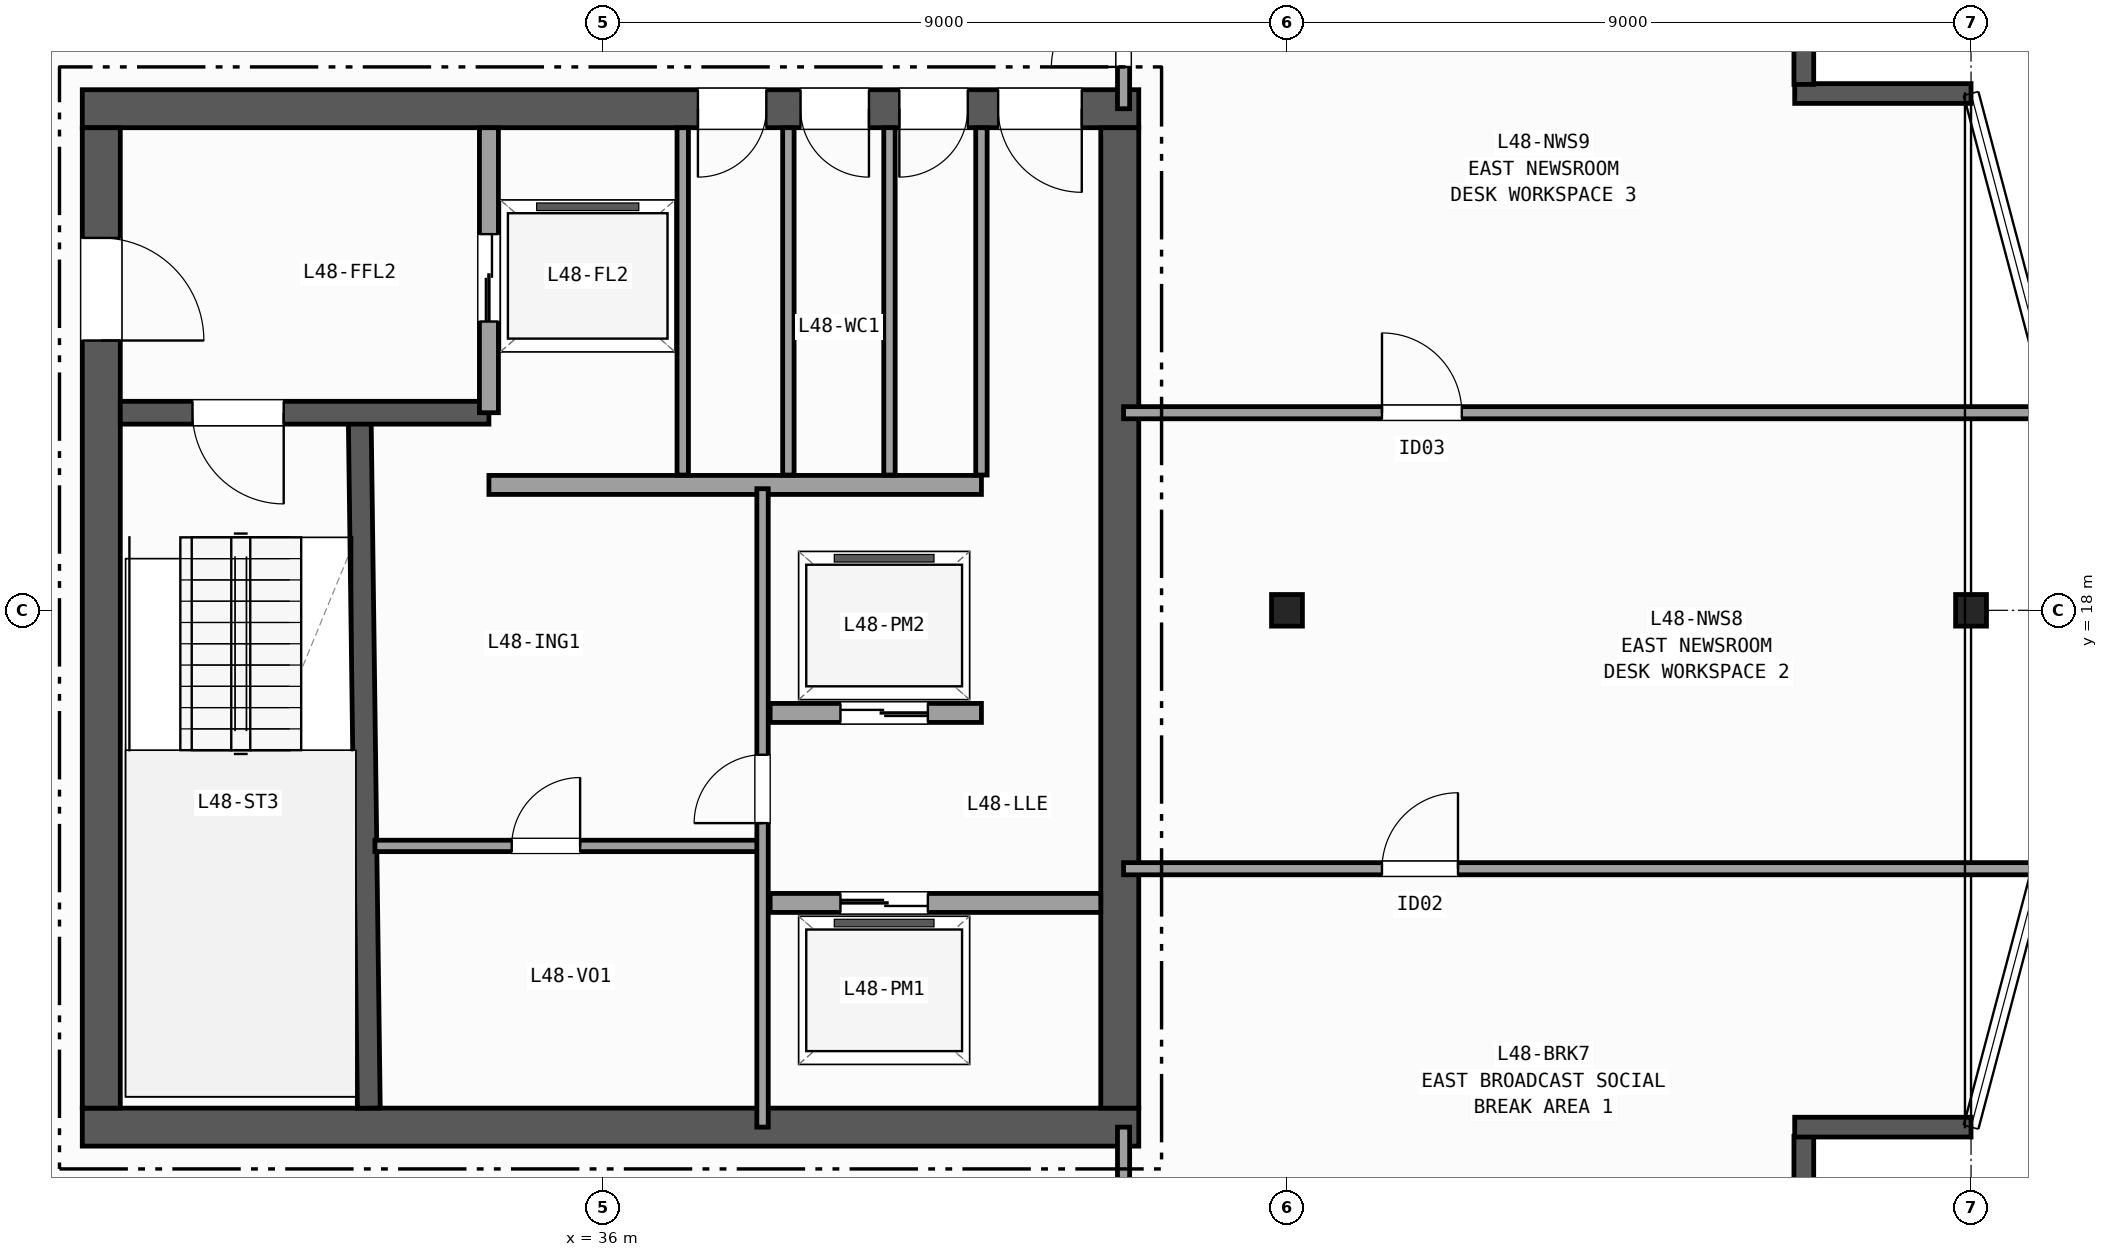
"""IFC4 building model, lengths in metres.
Left out: names, types, materials, properties, quantities, classifications, styles, units other than length and angle.
Written with IfcOpenShell. Run it as: python <this file> out.ifc"""

import sys

from ifc_helpers import new_model, si_unit, direction, frame, frame_2d, origin, origin_2d, place, context, subcontext, project, spatial, rectangle, i_section, extrude, element, fill, save


model = new_model("IFC4")
c1 = context("Model", 3, precision=1e-05, world=origin(), true_north=direction((0.0, 1.0)))
c2 = subcontext(c1, "Body", "Model", "MODEL_VIEW")
j1 = project(units=[si_unit("LENGTHUNIT", "METRE"), si_unit("PLANEANGLEUNIT", "RADIAN")], contexts=[c1])
p1 = place(None, origin())
s1 = spatial("IfcSite", under=j1, at=p1, CompositionType="ELEMENT")
p2 = place(p1, origin())
s2 = spatial("IfcBuilding", under=s1, at=p2, CompositionType="ELEMENT")
p3 = place(p2, frame((0.0, 0.0, 192.7)))
s3 = spatial("IfcBuildingStorey", under=s2, at=p3, CompositionType="ELEMENT", Elevation=192.7)
for number, where, z_axis, x_axis in (
    (1, (45.0, 18.0, 0.0), (0.0, 0.0, 1.0), (1.0, 0.0, 0.0)),
    (2, (54.0, 18.0, 0.0), (0.0, 0.0, 1.0), (1.0, 0.0, 0.0)),
):
    element("IfcColumn", number, at=place(p3, frame(where, z_axis=z_axis, x_axis=x_axis)), inside=s3, PredefinedType="COLUMN", context=c2, shape_type="SweptSolid", body=[
        extrude(i_section(OverallWidth=0.406, OverallDepth=0.416, WebThickness=0.03, FlangeThickness=0.048, FilletRadius=0.015, at=origin_2d()), origin(), (0.0, 0.0, 1.0), 3.7),
    ])
p4 = place(p3, frame((51.8, 9.0, 0.0), z_axis=(0.0, 0.0, 1.0), x_axis=(0.0, 1.0, 0.0)))
e3 = element("IfcWall", 3, at=p4, inside=s3, PredefinedType="SOLIDWALL", context=c2, shape_type="SweptSolid", body=[
    extrude(rectangle(XDim=2.08, YDim=0.26, at=frame_2d((1.04, 0.0))), origin(), (0.0, 0.0, 1.0), 3.37),
])
for number, where, z_axis, x_axis in (
    (4, (51.68, 11.2, 0.0), (0.0, 0.0, 1.0), (1.0, 0.0, 0.0)),
    (5, (54.0, 24.8, 0.0), (0.0, 0.0, 1.0), (-1.0, 0.0, 0.0)),
):
    element("IfcWall", number, at=place(p3, frame(where, z_axis=z_axis, x_axis=x_axis)), inside=s3, PredefinedType="SOLIDWALL", context=c2, shape_type="SweptSolid", body=[
        extrude(rectangle(XDim=2.32, YDim=0.26, at=frame_2d((1.16, 0.0))), origin(), (0.0, 0.0, 1.0), 3.37),
    ])
p5 = place(p3, frame((51.8, 24.92, 0.0), z_axis=(0.0, 0.0, 1.0), x_axis=(0.0, 1.0, 0.0)))
e6 = element("IfcWall", 6, at=p5, inside=s3, PredefinedType="SOLIDWALL", context=c2, shape_type="SweptSolid", body=[
    extrude(rectangle(XDim=2.08, YDim=0.26, at=frame_2d((1.04, 0.0))), origin(), (0.0, 0.0, 1.0), 3.37),
])
p6 = place(p3, frame((29.15, 11.2, 0.0), z_axis=(0.0, 0.0, 1.0), x_axis=(1.0, 0.0, 0.0)))
e7 = element("IfcWall", 7, at=p6, inside=s3, PredefinedType="SHEAR", context=c2, shape_type="SweptSolid", body=[
    extrude(rectangle(XDim=13.9, YDim=0.5, at=frame_2d((6.95, 0.0))), origin(), (0.0, 0.0, 1.0), 3.37),
])
p7 = place(p3, frame((43.05, 24.6, 0.0), z_axis=(0.0, 0.0, 1.0), x_axis=(-1.0, 0.0, 0.0)))
e8 = element("IfcWall", 8, at=p7, inside=s3, PredefinedType="SHEAR", context=c2, shape_type="SweptSolid", body=[
    extrude(rectangle(XDim=13.9, YDim=0.5, at=frame_2d((6.95, 0.0))), origin(), (0.0, 0.0, 1.0), 3.37),
])
p8 = place(p7, frame((0.75, 0.0, 0.0)))
e9 = element("IfcOpeningElement", 9, at=p8, cuts=e8, PredefinedType="OPENING", context=c2, shape_type="SweptSolid", body=[
    extrude(rectangle(XDim=1.1, YDim=2.15, at=frame_2d((0.55, 1.075))), frame((0.0, 0.26, 0.0), z_axis=(0.0, -1.0, 0.0), x_axis=(1.0, 0.0, 0.0)), (0.0, 0.0, 1.0), 0.52),
])
p9 = place(p7, frame((2.25, 0.0, 0.0)))
e10 = element("IfcOpeningElement", 10, at=p9, cuts=e8, PredefinedType="OPENING", context=c2, shape_type="SweptSolid", body=[
    extrude(rectangle(XDim=0.9, YDim=2.1, at=frame_2d((0.45, 1.05))), frame((0.0, 0.26, 0.0), z_axis=(0.0, -1.0, 0.0), x_axis=(1.0, 0.0, 0.0)), (0.0, 0.0, 1.0), 0.52),
])
p10 = place(p7, frame((3.55, 0.0, 0.0)))
e11 = element("IfcOpeningElement", 11, at=p10, cuts=e8, PredefinedType="OPENING", context=c2, shape_type="SweptSolid", body=[
    extrude(rectangle(XDim=0.9, YDim=2.1, at=frame_2d((0.45, 1.05))), frame((0.0, 0.26, 0.0), z_axis=(0.0, -1.0, 0.0), x_axis=(1.0, 0.0, 0.0)), (0.0, 0.0, 1.0), 0.52),
])
p11 = place(p7, frame((4.9, 0.0, 0.0)))
e12 = element("IfcOpeningElement", 12, at=p11, cuts=e8, PredefinedType="OPENING", context=c2, shape_type="SweptSolid", body=[
    extrude(rectangle(XDim=0.9, YDim=2.1, at=frame_2d((0.45, 1.05))), frame((0.0, 0.26, 0.0), z_axis=(0.0, -1.0, 0.0), x_axis=(1.0, 0.0, 0.0)), (0.0, 0.0, 1.0), 0.52),
])
p12 = place(p3, frame((29.4, 24.35, 0.0), z_axis=(0.0, 0.0, 1.0), x_axis=(0.0, -1.0, 0.0)))
e13 = element("IfcWall", 13, at=p12, inside=s3, PredefinedType="SHEAR", context=c2, shape_type="SweptSolid", body=[
    extrude(rectangle(XDim=12.9, YDim=0.5, at=frame_2d((6.45, 0.0))), origin(), (0.0, 0.0, 1.0), 3.37),
])
p13 = place(p12, frame((1.45, 0.0, 0.0)))
e14 = element("IfcOpeningElement", 14, at=p13, cuts=e13, PredefinedType="OPENING", context=c2, shape_type="SweptSolid", body=[
    extrude(rectangle(XDim=1.35, YDim=2.15, at=frame_2d((0.675, 1.075))), frame((0.0, 0.26, 0.0), z_axis=(0.0, -1.0, 0.0), x_axis=(1.0, 0.0, 0.0)), (0.0, 0.0, 1.0), 0.52),
])
p14 = place(p3, frame((42.8, 11.45, 0.0), z_axis=(0.0, 0.0, 1.0), x_axis=(0.0, 1.0, 0.0)))
e15 = element("IfcWall", 15, at=p14, inside=s3, PredefinedType="SHEAR", context=c2, shape_type="SweptSolid", body=[
    extrude(rectangle(XDim=12.9, YDim=0.5, at=frame_2d((6.45, 0.0))), origin(), (0.0, 0.0, 1.0), 3.37),
])
p15 = place(p3, frame((32.92, 11.45, 0.0), z_axis=(0.0, 0.0, 1.0), x_axis=(-0.013171578211, 0.999913251001, 0.0)))
e16 = element("IfcWall", 16, at=p15, inside=s3, PredefinedType="SHEAR", context=c2, shape_type="SweptSolid", body=[
    extrude(rectangle(XDim=9.101, YDim=0.3, at=frame_2d((4.55, 0.0))), origin(), (0.0, 0.0, 1.0), 3.37),
])
p16 = place(p3, frame((34.5, 20.6, 0.0), z_axis=(0.0, 0.0, 1.0), x_axis=(-1.0, 0.0, 0.0)))
e17 = element("IfcWall", 17, at=p16, inside=s3, PredefinedType="SHEAR", context=c2, shape_type="SweptSolid", body=[
    extrude(rectangle(XDim=4.85, YDim=0.3, at=frame_2d((2.425, 0.0))), origin(), (0.0, 0.0, 1.0), 3.37),
])
p17 = place(p16, frame((2.7, 0.0, 0.0)))
e18 = element("IfcOpeningElement", 18, at=p17, cuts=e17, PredefinedType="OPENING", context=c2, shape_type="SweptSolid", body=[
    extrude(rectangle(XDim=1.2, YDim=2.15, at=frame_2d((0.6, 1.075))), frame((0.0, 0.16, 0.0), z_axis=(0.0, -1.0, 0.0), x_axis=(1.0, 0.0, 0.0)), (0.0, 0.0, 1.0), 0.32),
])
p18 = place(p3, frame((34.5, 20.6, 0.0), z_axis=(0.0, 0.0, 1.0), x_axis=(0.0, 1.0, 0.0)))
e19 = element("IfcWall", 19, at=p18, inside=s3, PredefinedType="PARTITIONING", context=c2, shape_type="SweptSolid", body=[
    extrude(rectangle(XDim=3.75, YDim=0.25, at=frame_2d((1.875, 0.0))), origin(), (0.0, 0.0, 1.0), 3.37),
])
p19 = place(p18, frame((1.2, 0.0, 0.0)))
e20 = element("IfcOpeningElement", 20, at=p19, cuts=e19, PredefinedType="OPENING", context=c2, shape_type="SweptSolid", body=[
    extrude(rectangle(XDim=1.15, YDim=2.15, at=frame_2d((0.575, 1.075))), frame((0.0, 0.135, 0.0), z_axis=(0.0, -1.0, 0.0), x_axis=(1.0, 0.0, 0.0)), (0.0, 0.0, 1.0), 0.27),
])
p20 = place(p3, frame((34.5, 19.65, 0.0), z_axis=(0.0, 0.0, 1.0), x_axis=(1.0, 0.0, 0.0)))
e21 = element("IfcWall", 21, at=p20, inside=s3, PredefinedType="PARTITIONING", context=c2, shape_type="SweptSolid", body=[
    extrude(rectangle(XDim=6.48, YDim=0.25, at=frame_2d((3.24, 0.0))), origin(), (0.0, 0.0, 1.0), 3.37),
])
p21 = place(p3, frame((38.2, 14.15, 0.0), z_axis=(0.0, 0.0, 1.0), x_axis=(1.0, 0.0, 0.0)))
e22 = element("IfcWall", 22, at=p21, inside=s3, PredefinedType="PARTITIONING", context=c2, shape_type="SweptSolid", body=[
    extrude(rectangle(XDim=4.35, YDim=0.25, at=frame_2d((2.175, 0.0))), origin(), (0.0, 0.0, 1.0), 3.37),
])
p22 = place(p21, frame((0.925, 0.0, 0.0)))
e23 = element("IfcOpeningElement", 23, at=p22, cuts=e22, PredefinedType="OPENING", context=c2, shape_type="SweptSolid", body=[
    extrude(rectangle(XDim=1.15, YDim=2.15, at=frame_2d((0.575, 1.075))), frame((0.0, 0.135, 0.0), z_axis=(0.0, -1.0, 0.0), x_axis=(1.0, 0.0, 0.0)), (0.0, 0.0, 1.0), 0.27),
])
p23 = place(p3, frame((40.98, 16.65, 0.0), z_axis=(0.0, 0.0, 1.0), x_axis=(-1.0, 0.0, 0.0)))
e24 = element("IfcWall", 24, at=p23, inside=s3, PredefinedType="PARTITIONING", context=c2, shape_type="SweptSolid", body=[
    extrude(rectangle(XDim=2.78, YDim=0.25, at=frame_2d((1.39, 0.0))), origin(), (0.0, 0.0, 1.0), 3.37),
])
p24 = place(p23, frame((0.705, 0.0, 0.0)))
e25 = element("IfcOpeningElement", 25, at=p24, cuts=e24, PredefinedType="OPENING", context=c2, shape_type="SweptSolid", body=[
    extrude(rectangle(XDim=1.15, YDim=2.15, at=frame_2d((0.575, 1.075))), frame((0.0, 0.135, 0.0), z_axis=(0.0, -1.0, 0.0), x_axis=(1.0, 0.0, 0.0)), (0.0, 0.0, 1.0), 0.27),
])
p25 = place(p3, frame((33.0, 14.9, 0.0), z_axis=(0.0, 0.0, 1.0), x_axis=(1.0, 0.0, 0.0)))
e26 = element("IfcWall", 26, at=p25, inside=s3, PredefinedType="PARTITIONING", context=c2, shape_type="SweptSolid", body=[
    extrude(rectangle(XDim=5.1, YDim=0.15, at=frame_2d((2.55, 0.0))), origin(), (0.0, 0.0, 1.0), 3.37),
])
p26 = place(p25, frame((1.8, 0.0, 0.0)))
e27 = element("IfcOpeningElement", 27, at=p26, cuts=e26, PredefinedType="OPENING", context=c2, shape_type="SweptSolid", body=[
    extrude(rectangle(XDim=0.9, YDim=2.1, at=frame_2d((0.45, 1.05))), frame((0.0, 0.085, 0.0), z_axis=(0.0, -1.0, 0.0), x_axis=(1.0, 0.0, 0.0)), (0.0, 0.0, 1.0), 0.17),
])
p27 = place(p3, frame((38.1, 11.2, 0.0), z_axis=(0.0, 0.0, 1.0), x_axis=(0.0, 1.0, 0.0)))
e28 = element("IfcWall", 28, at=p27, inside=s3, PredefinedType="PARTITIONING", context=c2, shape_type="SweptSolid", body=[
    extrude(rectangle(XDim=8.4, YDim=0.15, at=frame_2d((4.2, 0.0))), origin(), (0.0, 0.0, 1.0), 3.37),
])
p28 = place(p27, frame((4.0, 0.0, 0.0)))
e29 = element("IfcOpeningElement", 29, at=p28, cuts=e28, PredefinedType="OPENING", context=c2, shape_type="SweptSolid", body=[
    extrude(rectangle(XDim=0.9, YDim=2.1, at=frame_2d((0.45, 1.05))), frame((0.0, 0.085, 0.0), z_axis=(0.0, -1.0, 0.0), x_axis=(1.0, 0.0, 0.0)), (0.0, 0.0, 1.0), 0.17),
])
for number, where, z_axis, x_axis in (
    (30, (37.05, 19.78, 0.0), (0.0, 0.0, 1.0), (0.0, 1.0, 0.0)),
    (31, (38.44, 19.78, 0.0), (0.0, 0.0, 1.0), (0.0, 1.0, 0.0)),
    (32, (39.77, 19.78, 0.0), (0.0, 0.0, 1.0), (0.0, 1.0, 0.0)),
    (33, (40.98, 19.78, 0.0), (0.0, 0.0, 1.0), (0.0, 1.0, 0.0)),
):
    element("IfcWall", number, at=place(p3, frame(where, z_axis=z_axis, x_axis=x_axis)), inside=s3, PredefinedType="PARTITIONING", context=c2, shape_type="SweptSolid", body=[
        extrude(rectangle(XDim=4.57, YDim=0.15, at=frame_2d((2.285, 0.0))), origin(), (0.0, 0.0, 1.0), 3.37),
    ])
p29 = place(p3, frame((42.85, 9.0, 0.0), z_axis=(0.0, 0.0, 1.0), x_axis=(0.0, 1.0, 0.0)))
e34 = element("IfcWall", 34, at=p29, inside=s3, PredefinedType="PARTITIONING", context=c2, shape_type="SweptSolid", body=[
    extrude(rectangle(XDim=2.2, YDim=0.16, at=frame_2d((1.1, 0.0))), origin(), (0.0, 0.0, 1.0), 2.584),
])
p30 = place(p3, frame((42.85, 24.6, 0.0), z_axis=(0.0, 0.0, 1.0), x_axis=(0.0, 1.0, 0.0)))
e35 = element("IfcWall", 35, at=p30, inside=s3, PredefinedType="PARTITIONING", context=c2, shape_type="SweptSolid", body=[
    extrude(rectangle(XDim=2.4, YDim=0.16, at=frame_2d((1.2, 0.0))), origin(), (0.0, 0.0, 1.0), 2.584),
])
p31 = place(p30, frame((0.55, 0.0, 0.0)))
e36 = element("IfcOpeningElement", 36, at=p31, cuts=e35, PredefinedType="OPENING", context=c2, shape_type="SweptSolid", body=[
    extrude(rectangle(XDim=0.95, YDim=2.1, at=frame_2d((0.475, 1.05))), frame((0.0, 0.09, 0.0), z_axis=(0.0, -1.0, 0.0), x_axis=(1.0, 0.0, 0.0)), (0.0, 0.0, 1.0), 0.18),
])
p32 = place(p3, frame((42.85, 14.6, 0.0), z_axis=(0.0, 0.0, 1.0), x_axis=(1.0, 0.0, 0.0)))
e37 = element("IfcWall", 37, at=p32, inside=s3, PredefinedType="PARTITIONING", context=c2, shape_type="SweptSolid", body=[
    extrude(rectangle(XDim=12.05, YDim=0.16, at=frame_2d((6.025, 0.0))), origin(), (0.0, 0.0, 1.0), 3.37),
])
p33 = place(p32, frame((3.4, 0.0, 0.0)))
e38 = element("IfcOpeningElement", 38, at=p33, cuts=e37, PredefinedType="OPENING", context=c2, shape_type="SweptSolid", body=[
    extrude(rectangle(XDim=1.0, YDim=2.1, at=frame_2d((0.5, 1.05))), frame((0.0, 0.09, 0.0), z_axis=(0.0, -1.0, 0.0), x_axis=(1.0, 0.0, 0.0)), (0.0, 0.0, 1.0), 0.18),
])
p34 = place(p3, frame((42.85, 20.6, 0.0), z_axis=(0.0, 0.0, 1.0), x_axis=(1.0, 0.0, 0.0)))
e39 = element("IfcWall", 39, at=p34, inside=s3, PredefinedType="PARTITIONING", context=c2, shape_type="SweptSolid", body=[
    extrude(rectangle(XDim=12.262, YDim=0.16, at=frame_2d((6.131, 0.0))), origin(), (0.0, 0.0, 1.0), 3.37),
])
p35 = place(p34, frame((3.4, 0.0, 0.0)))
e40 = element("IfcOpeningElement", 40, at=p35, cuts=e39, PredefinedType="OPENING", context=c2, shape_type="SweptSolid", body=[
    extrude(rectangle(XDim=1.05, YDim=2.15, at=frame_2d((0.525, 1.075))), frame((0.0, 0.09, 0.0), z_axis=(0.0, -1.0, 0.0), x_axis=(1.0, 0.0, 0.0)), (0.0, 0.0, 1.0), 0.18),
])
p36 = place(p17, origin())
e41 = element("IfcDoor", 41, at=p36, inside=s3, OperationType="SINGLE_SWING_LEFT", PredefinedType="DOOR", context=c2, shape_type="SweptSolid", body=[
    extrude(rectangle(XDim=1.2, YDim=2.15, at=frame_2d((0.6, 1.075))), frame((0.0, 0.025, 0.0), z_axis=(0.0, -1.0, 0.0), x_axis=(1.0, 0.0, 0.0)), (0.0, 0.0, 1.0), 0.05),
])
fill(e18, e41)
p37 = place(p13, origin())
e42 = element("IfcDoor", 42, at=p37, inside=s3, OperationType="SINGLE_SWING_RIGHT", PredefinedType="DOOR", context=c2, shape_type="SweptSolid", body=[
    extrude(rectangle(XDim=1.35, YDim=2.15, at=frame_2d((0.675, 1.075))), frame((0.0, 0.025, 0.0), z_axis=(0.0, -1.0, 0.0), x_axis=(1.0, 0.0, 0.0)), (0.0, 0.0, 1.0), 0.05),
])
fill(e14, e42)
p38 = place(p8, origin())
e43 = element("IfcDoor", 43, at=p38, inside=s3, OperationType="SINGLE_SWING_LEFT", PredefinedType="DOOR", context=c2, shape_type="SweptSolid", body=[
    extrude(rectangle(XDim=1.1, YDim=2.15, at=frame_2d((0.55, 1.075))), frame((0.0, 0.025, 0.0), z_axis=(0.0, -1.0, 0.0), x_axis=(1.0, 0.0, 0.0)), (0.0, 0.0, 1.0), 0.05),
])
fill(e9, e43)
p39 = place(p9, origin())
e44 = element("IfcDoor", 44, at=p39, inside=s3, OperationType="SINGLE_SWING_RIGHT", PredefinedType="DOOR", context=c2, shape_type="SweptSolid", body=[
    extrude(rectangle(XDim=0.9, YDim=2.1, at=frame_2d((0.45, 1.05))), frame((0.0, 0.025, 0.0), z_axis=(0.0, -1.0, 0.0), x_axis=(1.0, 0.0, 0.0)), (0.0, 0.0, 1.0), 0.05),
])
fill(e10, e44)
p40 = place(p10, origin())
e45 = element("IfcDoor", 45, at=p40, inside=s3, OperationType="SINGLE_SWING_LEFT", PredefinedType="DOOR", context=c2, shape_type="SweptSolid", body=[
    extrude(rectangle(XDim=0.9, YDim=2.1, at=frame_2d((0.45, 1.05))), frame((0.0, 0.025, 0.0), z_axis=(0.0, -1.0, 0.0), x_axis=(1.0, 0.0, 0.0)), (0.0, 0.0, 1.0), 0.05),
])
fill(e11, e45)
p41 = place(p11, origin())
e46 = element("IfcDoor", 46, at=p41, inside=s3, OperationType="SINGLE_SWING_RIGHT", PredefinedType="DOOR", context=c2, shape_type="SweptSolid", body=[
    extrude(rectangle(XDim=0.9, YDim=2.1, at=frame_2d((0.45, 1.05))), frame((0.0, 0.025, 0.0), z_axis=(0.0, -1.0, 0.0), x_axis=(1.0, 0.0, 0.0)), (0.0, 0.0, 1.0), 0.05),
])
fill(e12, e46)
p42 = place(p19, origin())
e47 = element("IfcDoor", 47, at=p42, inside=s3, OperationType="DOUBLE_DOOR_SLIDING", PredefinedType="DOOR", context=c2, shape_type="SweptSolid", body=[
    extrude(rectangle(XDim=1.15, YDim=2.15, at=frame_2d((0.575, 1.075))), frame((0.0, 0.025, 0.0), z_axis=(0.0, -1.0, 0.0), x_axis=(1.0, 0.0, 0.0)), (0.0, 0.0, 1.0), 0.05),
])
fill(e20, e47)
p43 = place(p22, origin())
e48 = element("IfcDoor", 48, at=p43, inside=s3, OperationType="DOUBLE_DOOR_SLIDING", PredefinedType="DOOR", context=c2, shape_type="SweptSolid", body=[
    extrude(rectangle(XDim=1.15, YDim=2.15, at=frame_2d((0.575, 1.075))), frame((0.0, 0.025, 0.0), z_axis=(0.0, -1.0, 0.0), x_axis=(1.0, 0.0, 0.0)), (0.0, 0.0, 1.0), 0.05),
])
fill(e23, e48)
p44 = place(p24, origin())
e49 = element("IfcDoor", 49, at=p44, inside=s3, OperationType="DOUBLE_DOOR_SLIDING", PredefinedType="DOOR", context=c2, shape_type="SweptSolid", body=[
    extrude(rectangle(XDim=1.15, YDim=2.15, at=frame_2d((0.575, 1.075))), frame((0.0, 0.025, 0.0), z_axis=(0.0, -1.0, 0.0), x_axis=(1.0, 0.0, 0.0)), (0.0, 0.0, 1.0), 0.05),
])
fill(e25, e49)
p45 = place(p28, origin())
e50 = element("IfcDoor", 50, at=p45, inside=s3, OperationType="SINGLE_SWING_LEFT", PredefinedType="DOOR", context=c2, shape_type="SweptSolid", body=[
    extrude(rectangle(XDim=0.9, YDim=2.1, at=frame_2d((0.45, 1.05))), frame((0.0, 0.025, 0.0), z_axis=(0.0, -1.0, 0.0), x_axis=(1.0, 0.0, 0.0)), (0.0, 0.0, 1.0), 0.05),
])
fill(e29, e50)
p46 = place(p26, origin())
e51 = element("IfcDoor", 51, at=p46, inside=s3, OperationType="SINGLE_SWING_RIGHT", PredefinedType="DOOR", context=c2, shape_type="SweptSolid", body=[
    extrude(rectangle(XDim=0.9, YDim=2.1, at=frame_2d((0.45, 1.05))), frame((0.0, 0.025, 0.0), z_axis=(0.0, -1.0, 0.0), x_axis=(1.0, 0.0, 0.0)), (0.0, 0.0, 1.0), 0.05),
])
fill(e27, e51)
p47 = place(p31, origin())
e52 = element("IfcDoor", 52, at=p47, inside=s3, OperationType="SINGLE_SWING_LEFT", PredefinedType="DOOR", context=c2, shape_type="SweptSolid", body=[
    extrude(rectangle(XDim=0.95, YDim=2.1, at=frame_2d((0.475, 1.05))), frame((0.0, 0.025, 0.0), z_axis=(0.0, -1.0, 0.0), x_axis=(1.0, 0.0, 0.0)), (0.0, 0.0, 1.0), 0.05),
])
fill(e36, e52)
p48 = place(p33, origin())
e53 = element("IfcDoor", 53, at=p48, inside=s3, OperationType="SINGLE_SWING_RIGHT", PredefinedType="DOOR", context=c2, shape_type="SweptSolid", body=[
    extrude(rectangle(XDim=1.0, YDim=2.1, at=frame_2d((0.5, 1.05))), frame((0.0, 0.025, 0.0), z_axis=(0.0, -1.0, 0.0), x_axis=(1.0, 0.0, 0.0)), (0.0, 0.0, 1.0), 0.05),
])
fill(e38, e53)
p49 = place(p35, origin())
e54 = element("IfcDoor", 54, at=p49, inside=s3, OperationType="SINGLE_SWING_LEFT", PredefinedType="DOOR", context=c2, shape_type="SweptSolid", body=[
    extrude(rectangle(XDim=1.05, YDim=2.15, at=frame_2d((0.525, 1.075))), frame((0.0, 0.025, 0.0), z_axis=(0.0, -1.0, 0.0), x_axis=(1.0, 0.0, 0.0)), (0.0, 0.0, 1.0), 0.05),
])
fill(e40, e54)
save(model, sys.argv[1])
